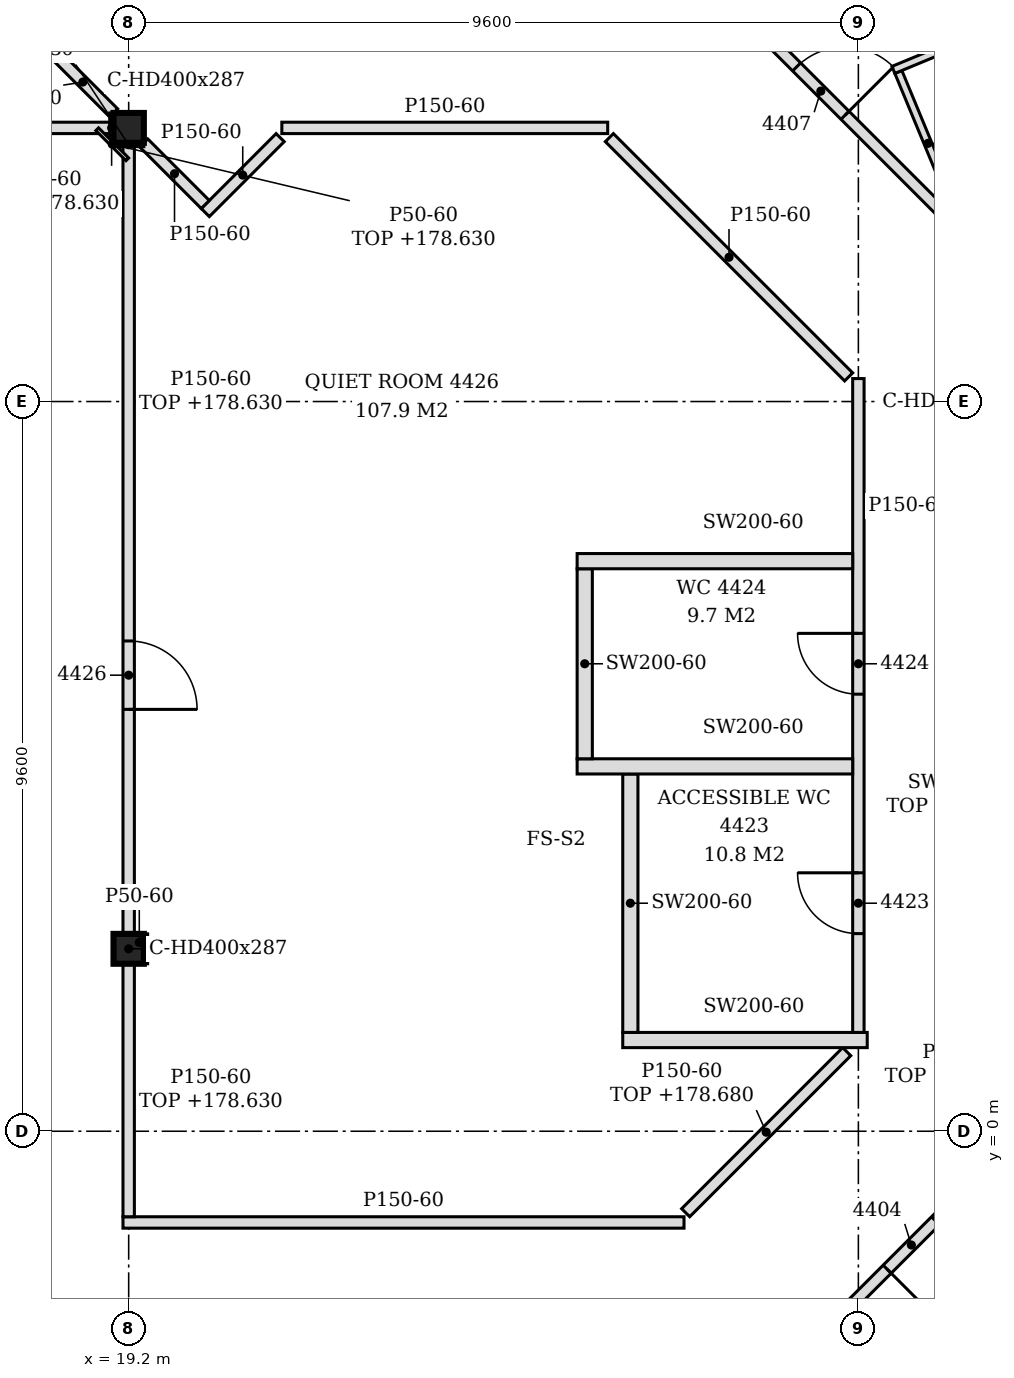
"""IFC4 building model, lengths in metres.
Left out: names, types, materials, properties, quantities, classifications, styles, units other than length and angle.
Written with IfcOpenShell. Run it as: python <this file> out.ifc"""

import sys

from ifc_helpers import new_model, si_unit, direction, frame, frame_2d, origin, origin_2d, place, context, subcontext, project, spatial, polyline, rectangle, i_section, outline, extrude, element, fill, save


model = new_model("IFC4")
c1 = context("Model", 3, precision=1e-05, world=origin(), true_north=direction((0.0, 1.0)))
c2 = subcontext(c1, "Body", "Model", "MODEL_VIEW")
j1 = project(units=[si_unit("LENGTHUNIT", "METRE"), si_unit("PLANEANGLEUNIT", "RADIAN")], contexts=[c1])
p1 = place(None, origin())
s1 = spatial("IfcSite", under=j1, at=p1, CompositionType="ELEMENT")
p2 = place(p1, origin())
s2 = spatial("IfcBuilding", under=s1, at=p2, CompositionType="ELEMENT")
p3 = place(p2, frame((0.0, 0.0, 175.8)))
s3 = spatial("IfcBuildingStorey", under=s2, at=p3, CompositionType="ELEMENT", Elevation=175.8)
for number, where, z_axis, x_axis in (
    (1, (19.2, 2.4, -0.15), (0.0, 0.0, 1.0), (1.0, 0.0, 0.0)),
    (2, (19.2, 13.2, -0.15), (0.0, 0.0, 1.0), (1.0, 0.0, 0.0)),
):
    element("IfcColumn", number, at=place(p3, frame(where, z_axis=z_axis, x_axis=x_axis)), inside=s3, PredefinedType="COLUMN", context=c2, shape_type="SweptSolid", body=[
        extrude(i_section(OverallWidth=0.399, OverallDepth=0.393, WebThickness=0.023, FlangeThickness=0.037, FilletRadius=0.015, at=origin_2d()), origin(), (0.0, 0.0, 1.0), 3.6),
    ])
p4 = place(p3, frame((22.722, -8.272, 0.0), z_axis=(0.0, 0.0, 1.0), x_axis=(0.707106781187, 0.707106781187, 0.0)))
e3 = element("IfcWall", 3, at=p4, inside=s3, PredefinedType="PARTITIONING", context=c2, shape_type="SweptSolid", body=[
    extrude(rectangle(XDim=11.549, YDim=0.15, at=frame_2d((5.774, 0.0))), origin(), (0.0, 0.0, 1.0), 2.88),
])
p5 = place(p4, frame((1.991, 0.0, 0.0)))
e4 = element("IfcOpeningElement", 4, at=p5, cuts=e3, PredefinedType="OPENING", context=c2, shape_type="SweptSolid", body=[
    extrude(rectangle(XDim=0.9, YDim=2.1, at=frame_2d((0.45, 1.05))), frame((0.0, 0.085, 0.0), z_axis=(0.0, -1.0, 0.0), x_axis=(1.0, 0.0, 0.0)), (0.0, 0.0, 1.0), 0.17),
])
p6 = place(p4, frame((9.131, 0.0, 0.0)))
e5 = element("IfcOpeningElement", 5, at=p6, cuts=e3, PredefinedType="OPENING", context=c2, shape_type="SweptSolid", body=[
    extrude(rectangle(XDim=0.9, YDim=2.1, at=frame_2d((0.45, 1.05))), frame((0.0, 0.085, 0.0), z_axis=(0.0, -1.0, 0.0), x_axis=(1.0, 0.0, 0.0)), (0.0, 0.0, 1.0), 0.17),
])
p7 = place(p3, frame((19.125, -1.2, 0.0), z_axis=(0.0, 0.0, 1.0), x_axis=(1.0, 0.0, 0.0)))
e6 = element("IfcWall", 6, at=p7, inside=s3, PredefinedType="PARTITIONING", context=c2, shape_type="SweptSolid", body=[
    extrude(outline(polyline([(0.0, 0.0), (7.381, 0.0), (7.381, 3.45), (0.225, 3.45), (0.223, 2.83), (0.0, 2.83), (0.0, 0.0)])), frame((0.0, 0.075, 0.0), z_axis=(0.0, -1.0, 0.0), x_axis=(1.0, 0.0, 0.0)), (0.0, 0.0, 1.0), 0.15),
])
p8 = place(p3, frame((19.2, -1.125, 0.0), z_axis=(0.0, 0.0, 1.0), x_axis=(0.0, 1.0, 0.0)))
e7 = element("IfcWall", 7, at=p8, inside=s3, PredefinedType="PARTITIONING", context=c2, shape_type="SweptSolid", body=[
    extrude(rectangle(XDim=3.329, YDim=0.15, at=frame_2d((1.664, 0.0))), origin(), (0.0, 0.0, 1.0), 2.83),
])
p9 = place(p3, frame((26.528, -1.072, 0.0), z_axis=(0.0, 0.0, 1.0), x_axis=(0.707106781187, 0.707106781187, 0.0)))
e8 = element("IfcWall", 8, at=p9, inside=s3, PredefinedType="PARTITIONING", context=c2, shape_type="SweptSolid", body=[
    extrude(rectangle(XDim=2.997, YDim=0.15, at=frame_2d((1.498, 0.0))), origin(), (0.0, 0.0, 1.0), 2.88),
])
p10 = place(p3, frame((25.7, 1.2, 0.0), z_axis=(0.0, 0.0, 1.0), x_axis=(1.0, 0.0, 0.0)))
e9 = element("IfcWall", 9, at=p10, inside=s3, PredefinedType="PARTITIONING", context=c2, shape_type="SweptSolid", body=[
    extrude(rectangle(XDim=3.217, YDim=0.2, at=frame_2d((1.608, 0.0))), origin(), (0.0, 0.0, 1.0), 3.45),
])
p11 = place(p3, frame((25.8, 1.3, 0.0), z_axis=(0.0, 0.0, 1.0), x_axis=(0.0, 1.0, 0.0)))
e10 = element("IfcWall", 10, at=p11, inside=s3, PredefinedType="PARTITIONING", context=c2, shape_type="SweptSolid", body=[
    extrude(outline(polyline([(0.0, 0.0), (3.4, 0.0), (3.4, 3.45), (3.005, 3.45), (3.003, 2.88), (2.795, 2.88), (2.793, 3.45), (0.0, 3.45), (0.0, 0.0)])), frame((0.0, 0.1, 0.0), z_axis=(0.0, -1.0, 0.0), x_axis=(1.0, 0.0, 0.0)), (0.0, 0.0, 1.0), 0.2),
])
p12 = place(p3, frame((28.8, 1.3, 0.0), z_axis=(0.0, 0.0, 1.0), x_axis=(0.0, 1.0, 0.0)))
e11 = element("IfcWall", 11, at=p12, inside=s3, PredefinedType="PARTITIONING", context=c2, shape_type="SweptSolid", body=[
    extrude(outline(polyline([(0.0, 0.0), (8.602, 0.0), (8.602, 3.45), (7.805, 3.45), (7.803, 2.88), (7.595, 2.88), (7.593, 3.45), (3.005, 3.45), (3.003, 2.88), (2.795, 2.88), (2.793, 3.45), (0.0, 3.45), (0.0, 0.0)])), frame((0.0, 0.075, 0.0), z_axis=(0.0, -1.0, 0.0), x_axis=(1.0, 0.0, 0.0)), (0.0, 0.0, 1.0), 0.15),
])
p13 = place(p12, frame((1.3, 0.0, 0.0)))
e12 = element("IfcOpeningElement", 12, at=p13, cuts=e11, PredefinedType="OPENING", context=c2, shape_type="SweptSolid", body=[
    extrude(rectangle(XDim=0.8, YDim=2.1, at=frame_2d((0.4, 1.05))), frame((0.0, 0.085, 0.0), z_axis=(0.0, -1.0, 0.0), x_axis=(1.0, 0.0, 0.0)), (0.0, 0.0, 1.0), 0.17),
])
p14 = place(p12, frame((4.45, 0.0, 0.0)))
e13 = element("IfcOpeningElement", 13, at=p14, cuts=e11, PredefinedType="OPENING", context=c2, shape_type="SweptSolid", body=[
    extrude(rectangle(XDim=0.8, YDim=2.1, at=frame_2d((0.4, 1.05))), frame((0.0, 0.085, 0.0), z_axis=(0.0, -1.0, 0.0), x_axis=(1.0, 0.0, 0.0)), (0.0, 0.0, 1.0), 0.17),
])
p15 = place(p3, frame((19.2, 2.596, 0.0), z_axis=(0.0, 0.0, 1.0), x_axis=(0.0, 1.0, 0.0)))
e14 = element("IfcWall", 14, at=p15, inside=s3, PredefinedType="PARTITIONING", context=c2, shape_type="SweptSolid", body=[
    extrude(rectangle(XDim=10.407, YDim=0.15, at=frame_2d((5.204, 0.0))), origin(), (0.0, 0.0, 1.0), 2.83),
])
p16 = place(p15, frame((2.954, 0.0, 0.0)))
e15 = element("IfcOpeningElement", 15, at=p16, cuts=e14, PredefinedType="OPENING", context=c2, shape_type="SweptSolid", body=[
    extrude(rectangle(XDim=0.9, YDim=2.1, at=frame_2d((0.45, 1.05))), frame((0.0, 0.085, 0.0), z_axis=(0.0, -1.0, 0.0), x_axis=(1.0, 0.0, 0.0)), (0.0, 0.0, 1.0), 0.17),
])
p17 = place(p3, frame((25.1, 4.8, 0.0), z_axis=(0.0, 0.0, 1.0), x_axis=(1.0, 0.0, 0.0)))
e16 = element("IfcWall", 16, at=p17, inside=s3, PredefinedType="PARTITIONING", context=c2, shape_type="SweptSolid", body=[
    extrude(rectangle(XDim=3.625, YDim=0.2, at=frame_2d((1.812, 0.0))), origin(), (0.0, 0.0, 1.0), 3.45),
])
p18 = place(p3, frame((25.2, 4.9, 0.0), z_axis=(0.0, 0.0, 1.0), x_axis=(0.0, 1.0, 0.0)))
e17 = element("IfcWall", 17, at=p18, inside=s3, PredefinedType="PARTITIONING", context=c2, shape_type="SweptSolid", body=[
    extrude(rectangle(XDim=2.5, YDim=0.2, at=frame_2d((1.25, 0.0))), origin(), (0.0, 0.0, 1.0), 3.45),
])
p19 = place(p3, frame((25.1, 7.5, 0.0), z_axis=(0.0, 0.0, 1.0), x_axis=(1.0, 0.0, 0.0)))
e18 = element("IfcWall", 18, at=p19, inside=s3, PredefinedType="PARTITIONING", context=c2, shape_type="SweptSolid", body=[
    extrude(rectangle(XDim=3.625, YDim=0.2, at=frame_2d((1.812, 0.0))), origin(), (0.0, 0.0, 1.0), 3.45),
])
p20 = place(p3, frame((28.672, 9.924, 0.0), z_axis=(0.0, 0.0, 1.0), x_axis=(-0.707134199585, 0.707079361725, 0.0)))
e19 = element("IfcWall", 19, at=p20, inside=s3, PredefinedType="PARTITIONING", context=c2, shape_type="SweptSolid", body=[
    extrude(rectangle(XDim=4.452, YDim=0.15, at=frame_2d((2.226, 0.0))), origin(), (0.0, 0.0, 1.0), 3.45),
])
p21 = place(p3, frame((31.072, 10.918, 0.0), z_axis=(0.0, 0.0, 1.0), x_axis=(-0.707106781187, 0.707106781187, 0.0)))
e20 = element("IfcWall", 20, at=p21, inside=s3, PredefinedType="PARTITIONING", context=c2, shape_type="SweptSolid", body=[
    extrude(rectangle(XDim=16.452, YDim=0.15, at=frame_2d((8.226, 0.0))), origin(), (0.0, 0.0, 1.0), 2.88),
])
p22 = place(p21, frame((3.462, 0.0, 0.0)))
e21 = element("IfcOpeningElement", 21, at=p22, cuts=e20, PredefinedType="OPENING", context=c2, shape_type="SweptSolid", body=[
    extrude(rectangle(XDim=0.9, YDim=2.1, at=frame_2d((0.45, 1.05))), frame((0.0, 0.085, 0.0), z_axis=(0.0, -1.0, 0.0), x_axis=(1.0, 0.0, 0.0)), (0.0, 0.0, 1.0), 0.17),
])
p23 = place(p21, frame((8.046, 0.0, 0.0)))
e22 = element("IfcOpeningElement", 22, at=p23, cuts=e20, PredefinedType="OPENING", context=c2, shape_type="SweptSolid", body=[
    extrude(rectangle(XDim=0.9, YDim=2.1, at=frame_2d((0.45, 1.05))), frame((0.0, 0.085, 0.0), z_axis=(0.0, -1.0, 0.0), x_axis=(1.0, 0.0, 0.0)), (0.0, 0.0, 1.0), 0.17),
])
p24 = place(p21, frame((12.53, 0.0, 0.0)))
e23 = element("IfcOpeningElement", 23, at=p24, cuts=e20, PredefinedType="OPENING", context=c2, shape_type="SweptSolid", body=[
    extrude(rectangle(XDim=0.9, YDim=2.1, at=frame_2d((0.45, 1.05))), frame((0.0, 0.085, 0.0), z_axis=(0.0, -1.0, 0.0), x_axis=(1.0, 0.0, 0.0)), (0.0, 0.0, 1.0), 0.17),
])
p25 = place(p3, frame((20.208, 12.086, 0.0), z_axis=(0.0, 0.0, 1.0), x_axis=(0.706756381459, 0.707457007363, 0.0)))
e24 = element("IfcWall", 24, at=p25, inside=s3, PredefinedType="PARTITIONING", context=c2, shape_type="SweptSolid", body=[
    extrude(rectangle(XDim=1.394, YDim=0.15, at=frame_2d((0.697, 0.0))), origin(), (0.0, 0.0, 1.0), 3.45),
])
p26 = place(p3, frame((30.104, 12.058, 0.0), z_axis=(0.0, 0.0, 1.0), x_axis=(-0.382627570994, 0.92390266907, 0.0)))
e25 = element("IfcWall", 25, at=p26, inside=s3, PredefinedType="PARTITIONING", context=c2, shape_type="SweptSolid", body=[
    extrude(rectangle(XDim=2.033, YDim=0.1, at=frame_2d((1.017, 0.0))), origin(), (0.0, 0.0, 1.0), 2.88),
])
p27 = place(p3, frame((20.208, 12.192, 0.0), z_axis=(0.0, 0.0, 1.0), x_axis=(-0.70721334539, 0.707000200921, 0.0)))
e26 = element("IfcWall", 26, at=p27, inside=s3, PredefinedType="PARTITIONING", context=c2, shape_type="SweptSolid", body=[
    extrude(rectangle(XDim=1.146, YDim=0.15, at=frame_2d((0.573, 0.0))), origin(), (0.0, 0.0, 1.0), 3.45),
])
p28 = place(p3, frame((7.399, 13.2, 0.0), z_axis=(0.0, 0.0, 1.0), x_axis=(1.0, 0.0, 0.0)))
e27 = element("IfcWall", 27, at=p28, inside=s3, PredefinedType="PARTITIONING", context=c2, shape_type="SweptSolid", body=[
    extrude(rectangle(XDim=11.601, YDim=0.15, at=frame_2d((5.801, 0.0))), origin(), (0.0, 0.0, 1.0), 2.83),
])
p29 = place(p28, frame((2.95, 0.0, 0.0)))
e28 = element("IfcOpeningElement", 28, at=p29, cuts=e27, PredefinedType="OPENING", context=c2, shape_type="SweptSolid", body=[
    extrude(rectangle(XDim=0.9, YDim=2.1, at=frame_2d((0.45, 1.05))), frame((0.0, 0.085, 0.0), z_axis=(0.0, -1.0, 0.0), x_axis=(1.0, 0.0, 0.0)), (0.0, 0.0, 1.0), 0.17),
])
p30 = place(p3, frame((21.215, 13.2, 0.0), z_axis=(0.0, 0.0, 1.0), x_axis=(1.0, 0.0, 0.0)))
e29 = element("IfcWall", 29, at=p30, inside=s3, PredefinedType="PARTITIONING", context=c2, shape_type="SweptSolid", body=[
    extrude(rectangle(XDim=4.287, YDim=0.15, at=frame_2d((2.144, 0.0))), origin(), (0.0, 0.0, 1.0), 3.45),
])
p31 = place(p3, frame((19.002, 13.398, 0.0), z_axis=(0.0, 0.0, 1.0), x_axis=(-0.707000200921, 0.70721334539, 0.0)))
e30 = element("IfcWall", 30, at=p31, inside=s3, PredefinedType="PARTITIONING", context=c2, shape_type="SweptSolid", body=[
    extrude(rectangle(XDim=1.146, YDim=0.15, at=frame_2d((0.573, 0.0))), origin(), (0.0, 0.0, 1.0), 3.45),
])
p32 = place(p3, frame((29.261, 13.963, 0.0), z_axis=(0.0, 0.0, 1.0), x_axis=(0.923929949387, 0.382561692574, 0.0)))
e31 = element("IfcWall", 31, at=p32, inside=s3, PredefinedType="PARTITIONING", context=c2, shape_type="SweptSolid", body=[
    extrude(rectangle(XDim=2.5, YDim=0.1, at=frame_2d((1.25, 0.0))), origin(), (0.0, 0.0, 1.0), 2.93),
])
p33 = place(p3, frame((18.086, 14.208, 0.0), z_axis=(0.0, 0.0, 1.0), x_axis=(0.70739723372, 0.706816209298, 0.0)))
e32 = element("IfcWall", 32, at=p33, inside=s3, PredefinedType="PARTITIONING", context=c2, shape_type="SweptSolid", body=[
    extrude(rectangle(XDim=1.681, YDim=0.15, at=frame_2d((0.84, 0.0))), origin(), (0.0, 0.0, 1.0), 2.73),
])
p34 = place(p3, frame((19.425, 2.204, 0.0), z_axis=(0.0, 0.0, 1.0), x_axis=(0.0, 1.0, 0.0)))
e33 = element("IfcWall", 33, at=p34, inside=s3, PredefinedType="PARTITIONING", context=c2, shape_type="SweptSolid", body=[
    extrude(rectangle(XDim=0.393, YDim=0.05, at=frame_2d((0.196, 0.0))), origin(), (0.0, 0.0, 1.0), 3.45),
])
p35 = place(p3, frame((18.976, 13.003, 0.0), z_axis=(0.0, 0.0, 1.0), x_axis=(0.0, 1.0, 0.0)))
e34 = element("IfcWall", 34, at=p35, inside=s3, PredefinedType="PARTITIONING", context=c2, shape_type="SweptSolid", body=[
    extrude(rectangle(XDim=0.393, YDim=0.05, at=frame_2d((0.197, 0.0))), origin(), (0.0, 0.0, 1.0), 2.83),
])
p36 = place(p3, frame((19.182, 12.786, 0.0), z_axis=(0.0, 0.0, 1.0), x_axis=(-0.707106781187, 0.707106781187, 0.0)))
e35 = element("IfcWall", 35, at=p36, inside=s3, PredefinedType="PARTITIONING", context=c2, shape_type="SweptSolid", body=[
    extrude(rectangle(XDim=0.56, YDim=0.05, at=frame_2d((0.28, 0.0))), origin(), (0.0, 0.0, 1.0), 2.83),
])
p37 = place(p3, frame((19.0, 12.979, 0.0), z_axis=(0.0, 0.0, 1.0), x_axis=(1.0, 0.0, 0.0)))
e36 = element("IfcWall", 36, at=p37, inside=s3, PredefinedType="PARTITIONING", context=c2, shape_type="SweptSolid", body=[
    extrude(rectangle(XDim=0.399, YDim=0.05, at=frame_2d((0.199, 0.0))), origin(), (0.0, 0.0, 1.0), 2.83),
])
p38 = place(p6, frame((0.9, 0.0, 0.0), z_axis=(0.0, 0.0, 1.0), x_axis=(-1.0, 0.0, 0.0)))
e37 = element("IfcDoor", 37, at=p38, inside=s3, OperationType="SINGLE_SWING_RIGHT", PredefinedType="DOOR", context=c2, shape_type="SweptSolid", body=[
    extrude(rectangle(XDim=0.9, YDim=2.1, at=frame_2d((0.45, 1.05))), frame((0.0, 0.025, 0.0), z_axis=(0.0, -1.0, 0.0), x_axis=(1.0, 0.0, 0.0)), (0.0, 0.0, 1.0), 0.05),
])
fill(e5, e37)
p39 = place(p22, frame((0.9, 0.0, 0.0), z_axis=(0.0, 0.0, 1.0), x_axis=(-1.0, 0.0, 0.0)))
e38 = element("IfcDoor", 38, at=p39, inside=s3, OperationType="SINGLE_SWING_RIGHT", PredefinedType="DOOR", context=c2, shape_type="SweptSolid", body=[
    extrude(rectangle(XDim=0.9, YDim=2.1, at=frame_2d((0.45, 1.05))), frame((0.0, 0.025, 0.0), z_axis=(0.0, -1.0, 0.0), x_axis=(1.0, 0.0, 0.0)), (0.0, 0.0, 1.0), 0.05),
])
fill(e21, e38)
p40 = place(p13, origin())
e39 = element("IfcDoor", 39, at=p40, inside=s3, OperationType="SINGLE_SWING_RIGHT", PredefinedType="DOOR", context=c2, shape_type="SweptSolid", body=[
    extrude(rectangle(XDim=0.8, YDim=2.1, at=frame_2d((0.4, 1.05))), frame((0.0, 0.025, 0.0), z_axis=(0.0, -1.0, 0.0), x_axis=(1.0, 0.0, 0.0)), (0.0, 0.0, 1.0), 0.05),
])
fill(e12, e39)
p41 = place(p14, origin())
e40 = element("IfcDoor", 40, at=p41, inside=s3, OperationType="SINGLE_SWING_RIGHT", PredefinedType="DOOR", context=c2, shape_type="SweptSolid", body=[
    extrude(rectangle(XDim=0.8, YDim=2.1, at=frame_2d((0.4, 1.05))), frame((0.0, 0.025, 0.0), z_axis=(0.0, -1.0, 0.0), x_axis=(1.0, 0.0, 0.0)), (0.0, 0.0, 1.0), 0.05),
])
fill(e13, e40)
p42 = place(p16, frame((0.9, 0.0, 0.0), z_axis=(0.0, 0.0, 1.0), x_axis=(-1.0, 0.0, 0.0)))
e41 = element("IfcDoor", 41, at=p42, inside=s3, OperationType="SINGLE_SWING_RIGHT", PredefinedType="DOOR", context=c2, shape_type="SweptSolid", body=[
    extrude(rectangle(XDim=0.9, YDim=2.1, at=frame_2d((0.45, 1.05))), frame((0.0, 0.025, 0.0), z_axis=(0.0, -1.0, 0.0), x_axis=(1.0, 0.0, 0.0)), (0.0, 0.0, 1.0), 0.05),
])
fill(e15, e41)
save(model, sys.argv[1])
